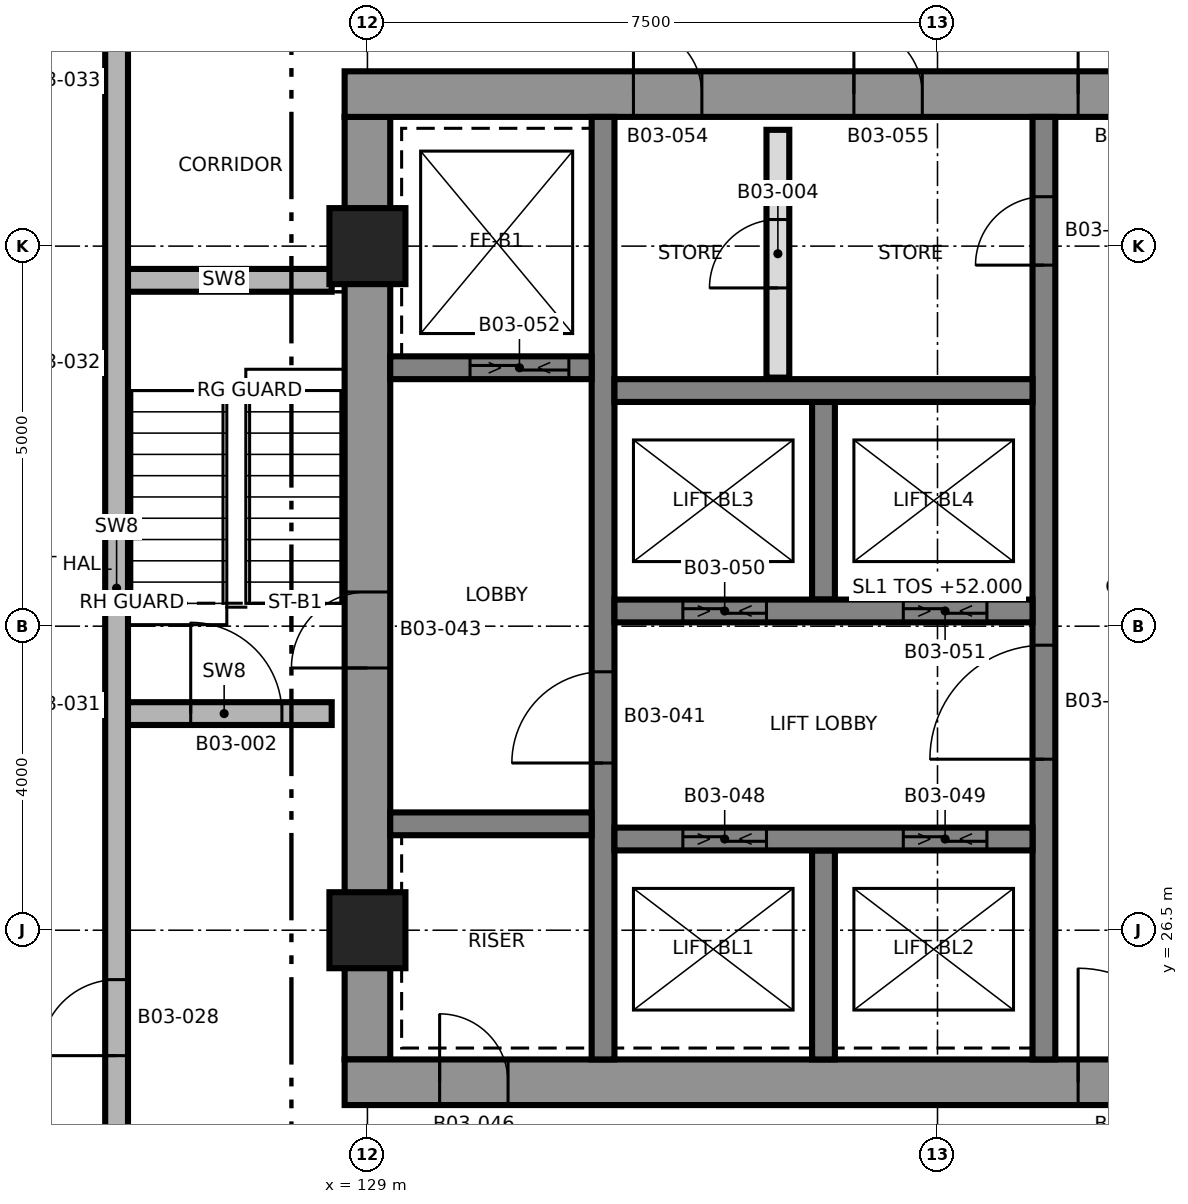
"""IFC4 building model, lengths in metres.
Left out: names, types, materials, properties, quantities, classifications, styles, units other than length and angle.
Written with IfcOpenShell. Run it as: python <this file> out.ifc"""

import sys

from ifc_helpers import new_model, si_unit, direction, frame, frame_2d, origin, origin_2d, place, context, subcontext, project, spatial, rectangle, extrude, element, fill, save


model = new_model("IFC4")
c1 = context("Model", 3, precision=1e-05, world=origin(), true_north=direction((0.0, 1.0)))
c2 = subcontext(c1, "Body", "Model", "MODEL_VIEW")
j1 = project(units=[si_unit("LENGTHUNIT", "METRE"), si_unit("PLANEANGLEUNIT", "RADIAN")], contexts=[c1])
p1 = place(None, origin())
s1 = spatial("IfcSite", under=j1, at=p1, CompositionType="ELEMENT")
p2 = place(p1, origin())
s2 = spatial("IfcBuilding", under=s1, at=p2, CompositionType="ELEMENT")
p3 = place(p2, frame((0.0, 0.0, 52.0)))
s3 = spatial("IfcBuildingStorey", under=s2, at=p3, CompositionType="ELEMENT", Elevation=52.0)
p4 = place(p3, frame((129.0, 24.8, 0.0), z_axis=(0.0, 0.0, 1.0), x_axis=(0.0, 1.0, 0.0)))
e1 = element("IfcWall", 1, at=p4, inside=s3, PredefinedType="SHEAR", context=c2, shape_type="SweptSolid", body=[
    extrude(rectangle(XDim=12.4, YDim=0.6, at=frame_2d((6.2, 0.0))), origin(), (0.0, 0.0, 1.0), 3.7),
])
p5 = place(p4, frame((5.15, 0.0, 0.0)))
e2 = element("IfcOpeningElement", 2, at=p5, cuts=e1, PredefinedType="OPENING", context=c2, shape_type="SweptSolid", body=[
    extrude(rectangle(XDim=1.0, YDim=2.1, at=frame_2d((0.5, 1.05))), frame((0.0, 0.31, 0.0), z_axis=(0.0, -1.0, 0.0), x_axis=(1.0, 0.0, 0.0)), (0.0, 0.0, 1.0), 0.62),
])
p6 = place(p3, frame((128.7, 24.5, 0.0), z_axis=(0.0, 0.0, 1.0), x_axis=(1.0, 0.0, 0.0)))
e3 = element("IfcWall", 3, at=p6, inside=s3, PredefinedType="SHEAR", context=c2, shape_type="SweptSolid", body=[
    extrude(rectangle(XDim=15.0, YDim=0.6, at=frame_2d((7.5, 0.0))), origin(), (0.0, 0.0, 1.0), 3.7),
])
p7 = place(p6, frame((9.65, 0.0, 0.0)))
e4 = element("IfcOpeningElement", 4, at=p7, cuts=e3, PredefinedType="OPENING", context=c2, shape_type="SweptSolid", body=[
    extrude(rectangle(XDim=1.5, YDim=2.1, at=frame_2d((0.75, 1.05))), frame((0.0, 0.31, 0.0), z_axis=(0.0, -1.0, 0.0), x_axis=(1.0, 0.0, 0.0)), (0.0, 0.0, 1.0), 0.62),
])
p8 = place(p6, frame((1.25, 0.0, 0.0)))
e5 = element("IfcOpeningElement", 5, at=p8, cuts=e3, PredefinedType="OPENING", context=c2, shape_type="SweptSolid", body=[
    extrude(rectangle(XDim=0.9, YDim=2.1, at=frame_2d((0.45, 1.05))), frame((0.0, 0.31, 0.0), z_axis=(0.0, -1.0, 0.0), x_axis=(1.0, 0.0, 0.0)), (0.0, 0.0, 1.0), 0.62),
])
p9 = place(p3, frame((128.7, 37.5, 0.0), z_axis=(0.0, 0.0, 1.0), x_axis=(1.0, 0.0, 0.0)))
e6 = element("IfcWall", 6, at=p9, inside=s3, PredefinedType="SHEAR", context=c2, shape_type="SweptSolid", body=[
    extrude(rectangle(XDim=15.0, YDim=0.6, at=frame_2d((7.5, 0.0))), origin(), (0.0, 0.0, 1.0), 3.7),
])
p10 = place(p9, frame((9.65, 0.0, 0.0)))
e7 = element("IfcOpeningElement", 7, at=p10, cuts=e6, PredefinedType="OPENING", context=c2, shape_type="SweptSolid", body=[
    extrude(rectangle(XDim=1.5, YDim=2.1, at=frame_2d((0.75, 1.05))), frame((0.0, 0.31, 0.0), z_axis=(0.0, -1.0, 0.0), x_axis=(1.0, 0.0, 0.0)), (0.0, 0.0, 1.0), 0.62),
])
p11 = place(p9, frame((12.85, 0.0, 0.0)))
e8 = element("IfcOpeningElement", 8, at=p11, cuts=e6, PredefinedType="OPENING", context=c2, shape_type="SweptSolid", body=[
    extrude(rectangle(XDim=0.9, YDim=2.1, at=frame_2d((0.45, 1.05))), frame((0.0, 0.31, 0.0), z_axis=(0.0, -1.0, 0.0), x_axis=(1.0, 0.0, 0.0)), (0.0, 0.0, 1.0), 0.62),
])
p12 = place(p9, frame((3.8, 0.0, 0.0)))
e9 = element("IfcOpeningElement", 9, at=p12, cuts=e6, PredefinedType="OPENING", context=c2, shape_type="SweptSolid", body=[
    extrude(rectangle(XDim=0.9, YDim=2.1, at=frame_2d((0.45, 1.05))), frame((0.0, 0.31, 0.0), z_axis=(0.0, -1.0, 0.0), x_axis=(1.0, 0.0, 0.0)), (0.0, 0.0, 1.0), 0.62),
])
p13 = place(p9, frame((6.7, 0.0, 0.0)))
e10 = element("IfcOpeningElement", 10, at=p13, cuts=e6, PredefinedType="OPENING", context=c2, shape_type="SweptSolid", body=[
    extrude(rectangle(XDim=0.9, YDim=2.1, at=frame_2d((0.45, 1.05))), frame((0.0, 0.31, 0.0), z_axis=(0.0, -1.0, 0.0), x_axis=(1.0, 0.0, 0.0)), (0.0, 0.0, 1.0), 0.62),
])
p14 = place(p3, frame((132.1, 24.8, 0.0), z_axis=(0.0, 0.0, 1.0), x_axis=(0.0, 1.0, 0.0)))
e11 = element("IfcWall", 11, at=p14, inside=s3, PredefinedType="SHEAR", context=c2, shape_type="SweptSolid", body=[
    extrude(rectangle(XDim=12.4, YDim=0.3, at=frame_2d((6.2, 0.0))), origin(), (0.0, 0.0, 1.0), 3.7),
])
p15 = place(p14, frame((3.9, 0.0, 0.0)))
e12 = element("IfcOpeningElement", 12, at=p15, cuts=e11, PredefinedType="OPENING", context=c2, shape_type="SweptSolid", body=[
    extrude(rectangle(XDim=1.2, YDim=2.1, at=frame_2d((0.6, 1.05))), frame((0.0, 0.16, 0.0), z_axis=(0.0, -1.0, 0.0), x_axis=(1.0, 0.0, 0.0)), (0.0, 0.0, 1.0), 0.32),
])
p16 = place(p3, frame((137.9, 24.8, 0.0), z_axis=(0.0, 0.0, 1.0), x_axis=(0.0, 1.0, 0.0)))
e13 = element("IfcWall", 13, at=p16, inside=s3, PredefinedType="SHEAR", context=c2, shape_type="SweptSolid", body=[
    extrude(rectangle(XDim=12.4, YDim=0.3, at=frame_2d((6.2, 0.0))), origin(), (0.0, 0.0, 1.0), 3.7),
])
p17 = place(p16, frame((3.95, 0.0, 0.0)))
e14 = element("IfcOpeningElement", 14, at=p17, cuts=e13, PredefinedType="OPENING", context=c2, shape_type="SweptSolid", body=[
    extrude(rectangle(XDim=1.5, YDim=2.1, at=frame_2d((0.75, 1.05))), frame((0.0, 0.16, 0.0), z_axis=(0.0, -1.0, 0.0), x_axis=(1.0, 0.0, 0.0)), (0.0, 0.0, 1.0), 0.32),
])
p18 = place(p16, frame((10.45, 0.0, 0.0)))
e15 = element("IfcOpeningElement", 15, at=p18, cuts=e13, PredefinedType="OPENING", context=c2, shape_type="SweptSolid", body=[
    extrude(rectangle(XDim=0.9, YDim=2.1, at=frame_2d((0.45, 1.05))), frame((0.0, 0.16, 0.0), z_axis=(0.0, -1.0, 0.0), x_axis=(1.0, 0.0, 0.0)), (0.0, 0.0, 1.0), 0.32),
])
p19 = place(p3, frame((135.0, 24.8, 0.0), z_axis=(0.0, 0.0, 1.0), x_axis=(0.0, 1.0, 0.0)))
e16 = element("IfcWall", 16, at=p19, inside=s3, PredefinedType="SHEAR", context=c2, shape_type="SweptSolid", body=[
    extrude(rectangle(XDim=2.75, YDim=0.3, at=frame_2d((1.375, 0.0))), origin(), (0.0, 0.0, 1.0), 3.7),
])
p20 = place(p3, frame((135.0, 30.85, 0.0), z_axis=(0.0, 0.0, 1.0), x_axis=(0.0, 1.0, 0.0)))
e17 = element("IfcWall", 17, at=p20, inside=s3, PredefinedType="SHEAR", context=c2, shape_type="SweptSolid", body=[
    extrude(rectangle(XDim=2.6, YDim=0.3, at=frame_2d((1.3, 0.0))), origin(), (0.0, 0.0, 1.0), 3.7),
])
p21 = place(p3, frame((132.25, 27.7, 0.0), z_axis=(0.0, 0.0, 1.0), x_axis=(1.0, 0.0, 0.0)))
e18 = element("IfcWall", 18, at=p21, inside=s3, PredefinedType="SHEAR", context=c2, shape_type="SweptSolid", body=[
    extrude(rectangle(XDim=5.5, YDim=0.3, at=frame_2d((2.75, 0.0))), origin(), (0.0, 0.0, 1.0), 3.7),
])
p22 = place(p21, frame((0.9, 0.0, 0.0)))
e19 = element("IfcOpeningElement", 19, at=p22, cuts=e18, PredefinedType="OPENING", context=c2, shape_type="SweptSolid", body=[
    extrude(rectangle(XDim=1.1, YDim=2.4, at=frame_2d((0.55, 1.2))), frame((0.0, 0.16, 0.0), z_axis=(0.0, -1.0, 0.0), x_axis=(1.0, 0.0, 0.0)), (0.0, 0.0, 1.0), 0.32),
])
p23 = place(p21, frame((3.8, 0.0, 0.0)))
e20 = element("IfcOpeningElement", 20, at=p23, cuts=e18, PredefinedType="OPENING", context=c2, shape_type="SweptSolid", body=[
    extrude(rectangle(XDim=1.1, YDim=2.4, at=frame_2d((0.55, 1.2))), frame((0.0, 0.16, 0.0), z_axis=(0.0, -1.0, 0.0), x_axis=(1.0, 0.0, 0.0)), (0.0, 0.0, 1.0), 0.32),
])
p24 = place(p3, frame((132.25, 30.7, 0.0), z_axis=(0.0, 0.0, 1.0), x_axis=(1.0, 0.0, 0.0)))
e21 = element("IfcWall", 21, at=p24, inside=s3, PredefinedType="SHEAR", context=c2, shape_type="SweptSolid", body=[
    extrude(rectangle(XDim=5.5, YDim=0.3, at=frame_2d((2.75, 0.0))), origin(), (0.0, 0.0, 1.0), 3.7),
])
p25 = place(p24, frame((0.9, 0.0, 0.0)))
e22 = element("IfcOpeningElement", 22, at=p25, cuts=e21, PredefinedType="OPENING", context=c2, shape_type="SweptSolid", body=[
    extrude(rectangle(XDim=1.1, YDim=2.4, at=frame_2d((0.55, 1.2))), frame((0.0, 0.16, 0.0), z_axis=(0.0, -1.0, 0.0), x_axis=(1.0, 0.0, 0.0)), (0.0, 0.0, 1.0), 0.32),
])
p26 = place(p24, frame((3.8, 0.0, 0.0)))
e23 = element("IfcOpeningElement", 23, at=p26, cuts=e21, PredefinedType="OPENING", context=c2, shape_type="SweptSolid", body=[
    extrude(rectangle(XDim=1.1, YDim=2.4, at=frame_2d((0.55, 1.2))), frame((0.0, 0.16, 0.0), z_axis=(0.0, -1.0, 0.0), x_axis=(1.0, 0.0, 0.0)), (0.0, 0.0, 1.0), 0.32),
])
p27 = place(p3, frame((132.25, 33.6, 0.0), z_axis=(0.0, 0.0, 1.0), x_axis=(1.0, 0.0, 0.0)))
e24 = element("IfcWall", 24, at=p27, inside=s3, PredefinedType="SHEAR", context=c2, shape_type="SweptSolid", body=[
    extrude(rectangle(XDim=5.5, YDim=0.3, at=frame_2d((2.75, 0.0))), origin(), (0.0, 0.0, 1.0), 3.7),
])
p28 = place(p3, frame((129.3, 27.9, 0.0), z_axis=(0.0, 0.0, 1.0), x_axis=(1.0, 0.0, 0.0)))
e25 = element("IfcWall", 25, at=p28, inside=s3, PredefinedType="SHEAR", context=c2, shape_type="SweptSolid", body=[
    extrude(rectangle(XDim=2.65, YDim=0.3, at=frame_2d((1.325, 0.0))), origin(), (0.0, 0.0, 1.0), 3.7),
])
p29 = place(p3, frame((129.3, 33.9, 0.0), z_axis=(0.0, 0.0, 1.0), x_axis=(1.0, 0.0, 0.0)))
e26 = element("IfcWall", 26, at=p29, inside=s3, PredefinedType="SHEAR", context=c2, shape_type="SweptSolid", body=[
    extrude(rectangle(XDim=2.65, YDim=0.3, at=frame_2d((1.325, 0.0))), origin(), (0.0, 0.0, 1.0), 3.7),
])
p30 = place(p29, frame((1.05, 0.0, 0.0)))
e27 = element("IfcOpeningElement", 27, at=p30, cuts=e26, PredefinedType="OPENING", context=c2, shape_type="SweptSolid", body=[
    extrude(rectangle(XDim=1.3, YDim=2.4, at=frame_2d((0.65, 1.2))), frame((0.0, 0.16, 0.0), z_axis=(0.0, -1.0, 0.0), x_axis=(1.0, 0.0, 0.0)), (0.0, 0.0, 1.0), 0.32),
])
for number, where, z_axis, x_axis in (
    (28, (129.0, 26.5, 0.0), (0.0, 0.0, 1.0), (1.0, 0.0, 0.0)),
    (29, (129.0, 35.5, 0.0), (0.0, 0.0, 1.0), (1.0, 0.0, 0.0)),
):
    element("IfcColumn", number, at=place(p3, frame(where, z_axis=z_axis, x_axis=x_axis)), inside=s3, PredefinedType="COLUMN", context=c2, shape_type="SweptSolid", body=[
        extrude(rectangle(XDim=1.0, YDim=1.0, at=origin_2d()), origin(), (0.0, 0.0, 1.0), 3.7),
    ])
p31 = place(p3, frame((125.7, 29.35, 0.0), z_axis=(0.0, 0.0, 1.0), x_axis=(1.0, 0.0, 0.0)))
e30 = element("IfcWall", 30, at=p31, inside=s3, PredefinedType="SHEAR", context=c2, shape_type="SweptSolid", body=[
    extrude(rectangle(XDim=2.83, YDim=0.3, at=frame_2d((1.415, 0.0))), origin(), (0.0, 0.0, 1.0), 3.4),
])
p32 = place(p31, frame((0.975, 0.0, 0.0)))
e31 = element("IfcOpeningElement", 31, at=p32, cuts=e30, PredefinedType="OPENING", context=c2, shape_type="SweptSolid", body=[
    extrude(rectangle(XDim=1.2, YDim=2.1, at=frame_2d((0.6, 1.05))), frame((0.0, 0.16, 0.0), z_axis=(0.0, -1.0, 0.0), x_axis=(1.0, 0.0, 0.0)), (0.0, 0.0, 1.0), 0.32),
])
p33 = place(p3, frame((125.7, 35.05, 0.0), z_axis=(0.0, 0.0, 1.0), x_axis=(1.0, 0.0, 0.0)))
e32 = element("IfcWall", 32, at=p33, inside=s3, PredefinedType="SHEAR", context=c2, shape_type="SweptSolid", body=[
    extrude(rectangle(XDim=2.83, YDim=0.3, at=frame_2d((1.415, 0.0))), origin(), (0.0, 0.0, 1.0), 3.4),
])
p34 = place(p3, frame((125.7, 22.15, 0.0), z_axis=(0.0, 0.0, 1.0), x_axis=(0.0, 1.0, 0.0)))
e33 = element("IfcWall", 33, at=p34, inside=s3, PredefinedType="SHEAR", context=c2, shape_type="SweptSolid", body=[
    extrude(rectangle(XDim=17.7, YDim=0.3, at=frame_2d((8.85, 0.0))), origin(), (0.0, 0.0, 1.0), 3.4),
])
p35 = place(p34, frame((2.7, 0.0, 0.0)))
e34 = element("IfcOpeningElement", 34, at=p35, cuts=e33, PredefinedType="OPENING", context=c2, shape_type="SweptSolid", body=[
    extrude(rectangle(XDim=1.0, YDim=2.1, at=frame_2d((0.5, 1.05))), frame((0.0, 0.16, 0.0), z_axis=(0.0, -1.0, 0.0), x_axis=(1.0, 0.0, 0.0)), (0.0, 0.0, 1.0), 0.32),
])
p36 = place(p3, frame((134.4, 33.77, 0.0), z_axis=(0.0, 0.0, 1.0), x_axis=(0.0, 1.0, 0.0)))
e35 = element("IfcWall", 35, at=p36, inside=s3, PredefinedType="PARTITIONING", context=c2, shape_type="SweptSolid", body=[
    extrude(rectangle(XDim=3.26, YDim=0.3, at=frame_2d((1.63, 0.0))), origin(), (0.0, 0.0, 1.0), 3.4),
])
p37 = place(p36, frame((1.18, 0.0, 0.0)))
e36 = element("IfcOpeningElement", 36, at=p37, cuts=e35, PredefinedType="OPENING", context=c2, shape_type="SweptSolid", body=[
    extrude(rectangle(XDim=0.9, YDim=2.1, at=frame_2d((0.45, 1.05))), frame((0.0, 0.16, 0.0), z_axis=(0.0, -1.0, 0.0), x_axis=(1.0, 0.0, 0.0)), (0.0, 0.0, 1.0), 0.32),
])
p38 = place(p32, origin())
e37 = element("IfcDoor", 37, at=p38, inside=s3, OperationType="SINGLE_SWING_RIGHT", PredefinedType="DOOR", context=c2, shape_type="SweptSolid", body=[
    extrude(rectangle(XDim=1.2, YDim=2.1, at=frame_2d((0.6, 1.05))), frame((0.0, 0.025, 0.0), z_axis=(0.0, -1.0, 0.0), x_axis=(1.0, 0.0, 0.0)), (0.0, 0.0, 1.0), 0.05),
])
fill(e31, e37)
p39 = place(p37, origin())
e38 = element("IfcDoor", 38, at=p39, inside=s3, OperationType="SINGLE_SWING_RIGHT", PredefinedType="DOOR", context=c2, shape_type="SweptSolid", body=[
    extrude(rectangle(XDim=0.9, YDim=2.1, at=frame_2d((0.45, 1.05))), frame((0.0, 0.025, 0.0), z_axis=(0.0, -1.0, 0.0), x_axis=(1.0, 0.0, 0.0)), (0.0, 0.0, 1.0), 0.05),
])
fill(e36, e38)
p40 = place(p35, origin())
e39 = element("IfcDoor", 39, at=p40, inside=s3, OperationType="SINGLE_SWING_RIGHT", PredefinedType="DOOR", context=c2, shape_type="SweptSolid", body=[
    extrude(rectangle(XDim=1.0, YDim=2.1, at=frame_2d((0.5, 1.05))), frame((0.0, 0.025, 0.0), z_axis=(0.0, -1.0, 0.0), x_axis=(1.0, 0.0, 0.0)), (0.0, 0.0, 1.0), 0.05),
])
fill(e34, e39)
p41 = place(p17, origin())
e40 = element("IfcDoor", 40, at=p41, inside=s3, OperationType="SINGLE_SWING_RIGHT", PredefinedType="DOOR", context=c2, shape_type="SweptSolid", body=[
    extrude(rectangle(XDim=1.5, YDim=2.1, at=frame_2d((0.75, 1.05))), frame((0.0, 0.025, 0.0), z_axis=(0.0, -1.0, 0.0), x_axis=(1.0, 0.0, 0.0)), (0.0, 0.0, 1.0), 0.05),
])
fill(e14, e40)
p42 = place(p15, origin())
e41 = element("IfcDoor", 41, at=p42, inside=s3, OperationType="SINGLE_SWING_LEFT", PredefinedType="DOOR", context=c2, shape_type="SweptSolid", body=[
    extrude(rectangle(XDim=1.2, YDim=2.1, at=frame_2d((0.6, 1.05))), frame((0.0, 0.025, 0.0), z_axis=(0.0, -1.0, 0.0), x_axis=(1.0, 0.0, 0.0)), (0.0, 0.0, 1.0), 0.05),
])
fill(e12, e41)
p43 = place(p5, origin())
e42 = element("IfcDoor", 42, at=p43, inside=s3, OperationType="SINGLE_SWING_RIGHT", PredefinedType="DOOR", context=c2, shape_type="SweptSolid", body=[
    extrude(rectangle(XDim=1.0, YDim=2.1, at=frame_2d((0.5, 1.05))), frame((0.0, 0.025, 0.0), z_axis=(0.0, -1.0, 0.0), x_axis=(1.0, 0.0, 0.0)), (0.0, 0.0, 1.0), 0.05),
])
fill(e2, e42)
p44 = place(p7, origin())
e43 = element("IfcDoor", 43, at=p44, inside=s3, OperationType="SINGLE_SWING_LEFT", PredefinedType="DOOR", context=c2, shape_type="SweptSolid", body=[
    extrude(rectangle(XDim=1.5, YDim=2.1, at=frame_2d((0.75, 1.05))), frame((0.0, 0.025, 0.0), z_axis=(0.0, -1.0, 0.0), x_axis=(1.0, 0.0, 0.0)), (0.0, 0.0, 1.0), 0.05),
])
fill(e4, e43)
p45 = place(p10, origin())
e44 = element("IfcDoor", 44, at=p45, inside=s3, OperationType="SINGLE_SWING_RIGHT", PredefinedType="DOOR", context=c2, shape_type="SweptSolid", body=[
    extrude(rectangle(XDim=1.5, YDim=2.1, at=frame_2d((0.75, 1.05))), frame((0.0, 0.025, 0.0), z_axis=(0.0, -1.0, 0.0), x_axis=(1.0, 0.0, 0.0)), (0.0, 0.0, 1.0), 0.05),
])
fill(e7, e44)
p46 = place(p8, origin())
e45 = element("IfcDoor", 45, at=p46, inside=s3, OperationType="SINGLE_SWING_LEFT", PredefinedType="DOOR", context=c2, shape_type="SweptSolid", body=[
    extrude(rectangle(XDim=0.9, YDim=2.1, at=frame_2d((0.45, 1.05))), frame((0.0, 0.025, 0.0), z_axis=(0.0, -1.0, 0.0), x_axis=(1.0, 0.0, 0.0)), (0.0, 0.0, 1.0), 0.05),
])
fill(e5, e45)
p47 = place(p22, origin())
e46 = element("IfcDoor", 46, at=p47, inside=s3, OperationType="SLIDING_TO_LEFT", PredefinedType="DOOR", context=c2, shape_type="SweptSolid", body=[
    extrude(rectangle(XDim=1.1, YDim=2.4, at=frame_2d((0.55, 1.2))), frame((0.0, 0.025, 0.0), z_axis=(0.0, -1.0, 0.0), x_axis=(1.0, 0.0, 0.0)), (0.0, 0.0, 1.0), 0.05),
])
fill(e19, e46)
p48 = place(p23, origin())
e47 = element("IfcDoor", 47, at=p48, inside=s3, OperationType="SLIDING_TO_LEFT", PredefinedType="DOOR", context=c2, shape_type="SweptSolid", body=[
    extrude(rectangle(XDim=1.1, YDim=2.4, at=frame_2d((0.55, 1.2))), frame((0.0, 0.025, 0.0), z_axis=(0.0, -1.0, 0.0), x_axis=(1.0, 0.0, 0.0)), (0.0, 0.0, 1.0), 0.05),
])
fill(e20, e47)
p49 = place(p25, origin())
e48 = element("IfcDoor", 48, at=p49, inside=s3, OperationType="SLIDING_TO_LEFT", PredefinedType="DOOR", context=c2, shape_type="SweptSolid", body=[
    extrude(rectangle(XDim=1.1, YDim=2.4, at=frame_2d((0.55, 1.2))), frame((0.0, 0.025, 0.0), z_axis=(0.0, -1.0, 0.0), x_axis=(1.0, 0.0, 0.0)), (0.0, 0.0, 1.0), 0.05),
])
fill(e22, e48)
p50 = place(p26, origin())
e49 = element("IfcDoor", 49, at=p50, inside=s3, OperationType="SLIDING_TO_LEFT", PredefinedType="DOOR", context=c2, shape_type="SweptSolid", body=[
    extrude(rectangle(XDim=1.1, YDim=2.4, at=frame_2d((0.55, 1.2))), frame((0.0, 0.025, 0.0), z_axis=(0.0, -1.0, 0.0), x_axis=(1.0, 0.0, 0.0)), (0.0, 0.0, 1.0), 0.05),
])
fill(e23, e49)
p51 = place(p30, origin())
e50 = element("IfcDoor", 50, at=p51, inside=s3, OperationType="SLIDING_TO_LEFT", PredefinedType="DOOR", context=c2, shape_type="SweptSolid", body=[
    extrude(rectangle(XDim=1.3, YDim=2.4, at=frame_2d((0.65, 1.2))), frame((0.0, 0.025, 0.0), z_axis=(0.0, -1.0, 0.0), x_axis=(1.0, 0.0, 0.0)), (0.0, 0.0, 1.0), 0.05),
])
fill(e27, e50)
p52 = place(p12, origin())
e51 = element("IfcDoor", 51, at=p52, inside=s3, OperationType="SINGLE_SWING_LEFT", PredefinedType="DOOR", context=c2, shape_type="SweptSolid", body=[
    extrude(rectangle(XDim=0.9, YDim=2.1, at=frame_2d((0.45, 1.05))), frame((0.0, 0.025, 0.0), z_axis=(0.0, -1.0, 0.0), x_axis=(1.0, 0.0, 0.0)), (0.0, 0.0, 1.0), 0.05),
])
fill(e9, e51)
p53 = place(p13, origin())
e52 = element("IfcDoor", 52, at=p53, inside=s3, OperationType="SINGLE_SWING_RIGHT", PredefinedType="DOOR", context=c2, shape_type="SweptSolid", body=[
    extrude(rectangle(XDim=0.9, YDim=2.1, at=frame_2d((0.45, 1.05))), frame((0.0, 0.025, 0.0), z_axis=(0.0, -1.0, 0.0), x_axis=(1.0, 0.0, 0.0)), (0.0, 0.0, 1.0), 0.05),
])
fill(e10, e52)
p54 = place(p18, origin())
e53 = element("IfcDoor", 53, at=p54, inside=s3, OperationType="SINGLE_SWING_RIGHT", PredefinedType="DOOR", context=c2, shape_type="SweptSolid", body=[
    extrude(rectangle(XDim=0.9, YDim=2.1, at=frame_2d((0.45, 1.05))), frame((0.0, 0.025, 0.0), z_axis=(0.0, -1.0, 0.0), x_axis=(1.0, 0.0, 0.0)), (0.0, 0.0, 1.0), 0.05),
])
fill(e15, e53)
save(model, sys.argv[1])
